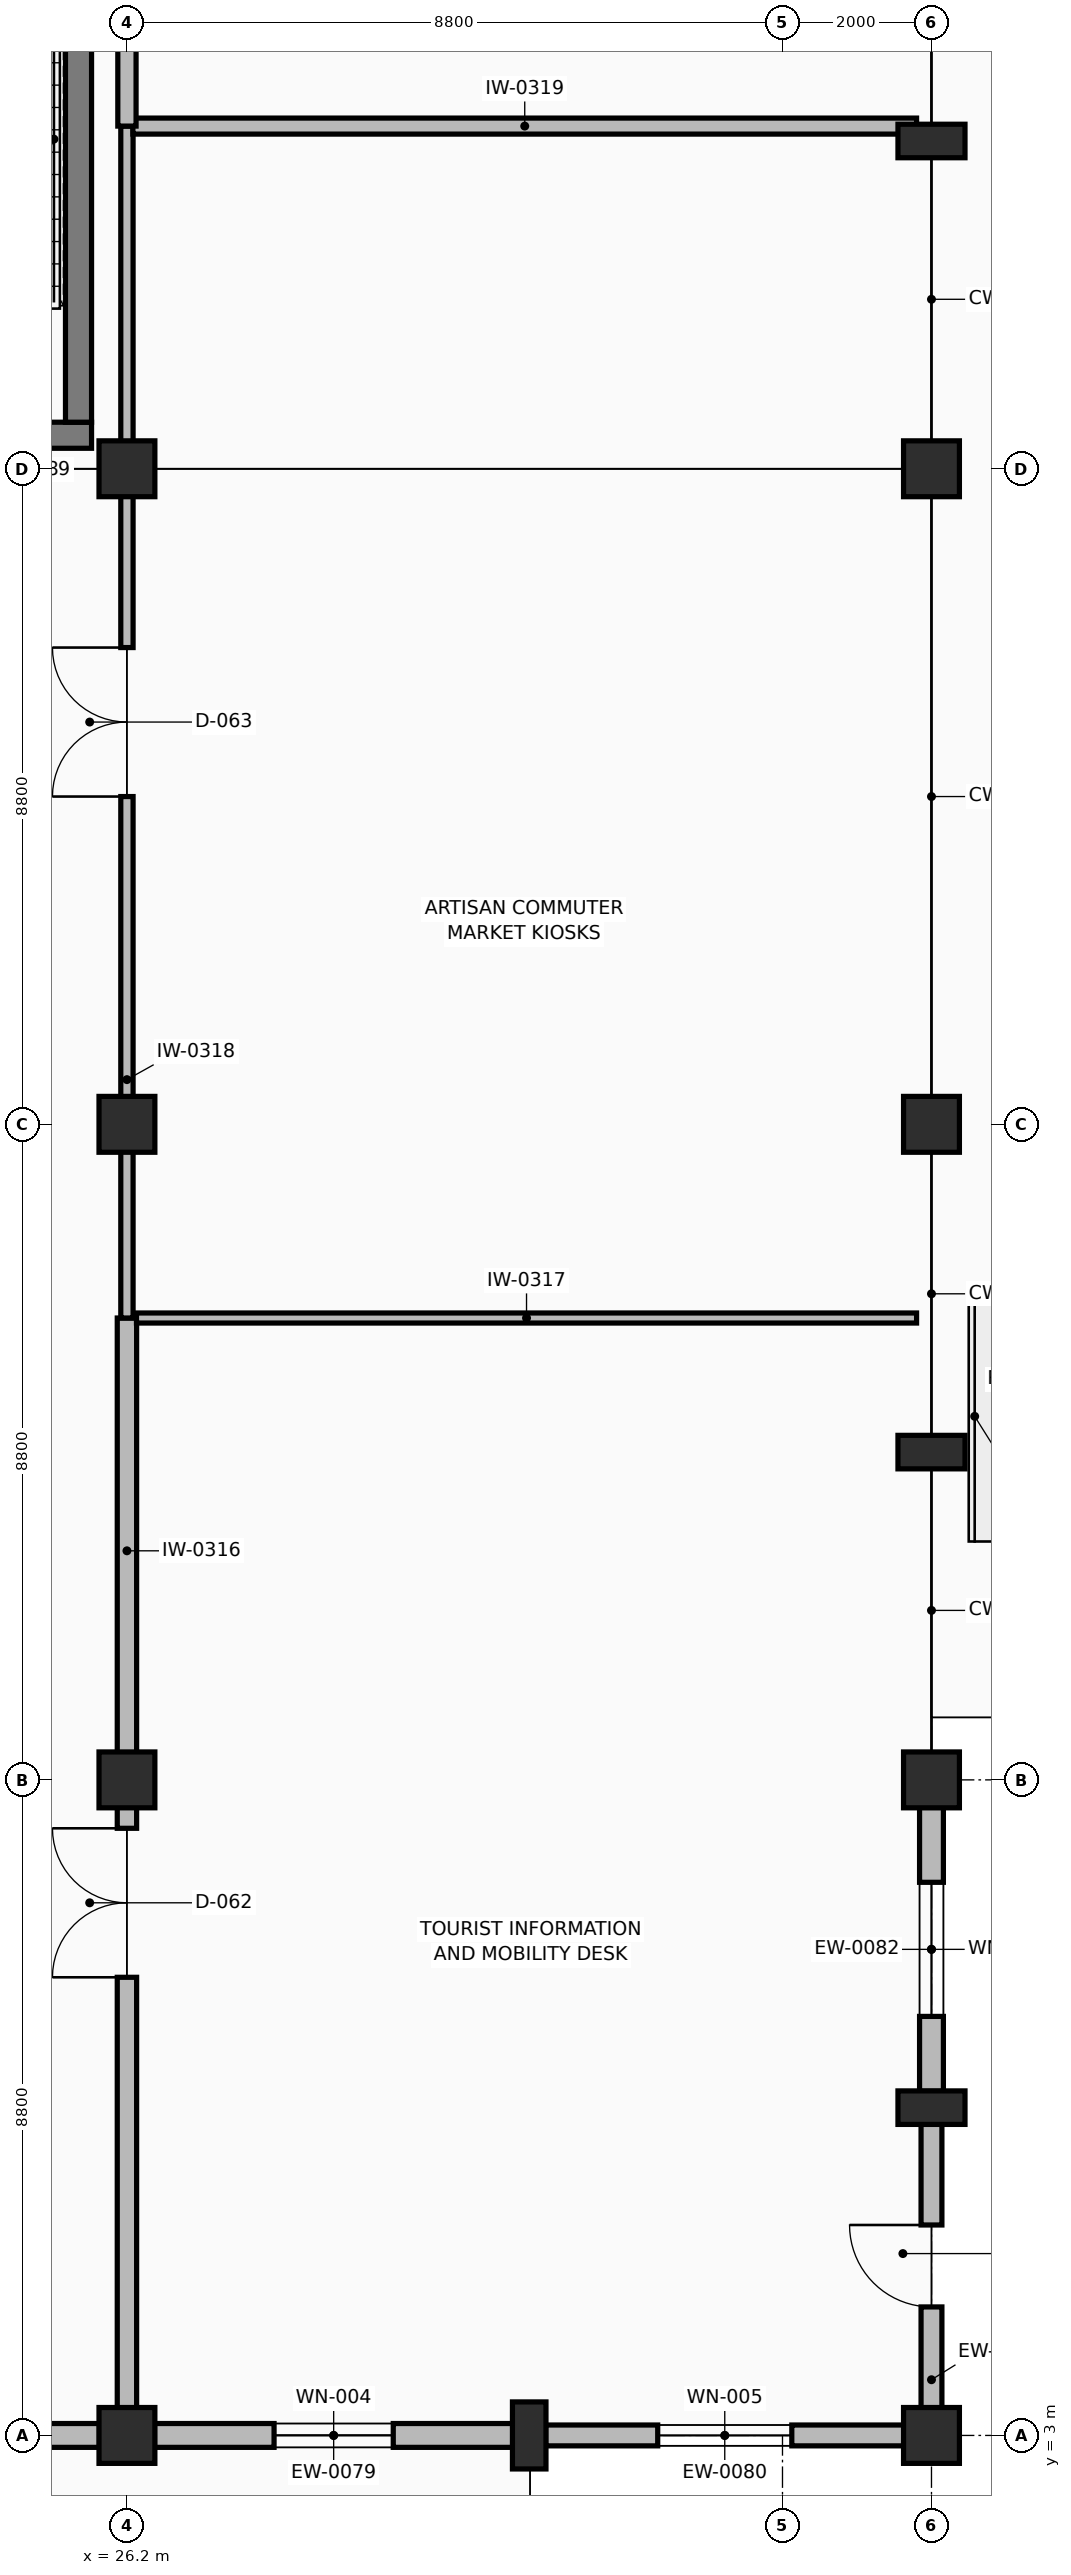
"""IFC4 building model, lengths in metres.
Left out: names, types, materials, properties, quantities, classifications, styles, units other than length and angle.
Written with IfcOpenShell. Run it as: python <this file> out.ifc"""

import sys

from ifc_helpers import new_model, si_unit, direction, frame, frame_2d, origin, origin_2d, place, context, subcontext, project, spatial, rectangle, extrude, element, fill, save


model = new_model("IFC4")
c1 = context("Model", 3, precision=1e-05, world=origin(), true_north=direction((0.0, 1.0)))
c2 = subcontext(c1, "Body", "Model", "MODEL_VIEW")
j1 = project(units=[si_unit("LENGTHUNIT", "METRE"), si_unit("PLANEANGLEUNIT", "RADIAN")], contexts=[c1])
p1 = place(None, origin())
s1 = spatial("IfcSite", under=j1, at=p1, CompositionType="ELEMENT")
p2 = place(p1, origin())
s2 = spatial("IfcBuilding", under=s1, at=p2, CompositionType="ELEMENT")
p3 = place(p2, origin())
s3 = spatial("IfcBuildingStorey", under=s2, at=p3, CompositionType="ELEMENT", Elevation=0.0)
for number, where, z_axis, x_axis in (
    (1, (26.2, 3.0, 0.0), (0.0, 0.0, 1.0), (1.0, 0.0, 0.0)),
    (2, (26.2, 11.8, 0.0), (0.0, 0.0, 1.0), (1.0, 0.0, 0.0)),
    (3, (26.2, 20.6, 0.0), (0.0, 0.0, 1.0), (1.0, 0.0, 0.0)),
    (4, (26.2, 29.4, 0.0), (0.0, 0.0, 1.0), (1.0, 0.0, 0.0)),
    (5, (37.0, 3.0, 0.0), (0.0, 0.0, 1.0), (1.0, 0.0, 0.0)),
    (6, (37.0, 11.8, 0.0), (0.0, 0.0, 1.0), (1.0, 0.0, 0.0)),
    (7, (37.0, 20.6, 0.0), (0.0, 0.0, 1.0), (1.0, 0.0, 0.0)),
    (8, (37.0, 29.4, 0.0), (0.0, 0.0, 1.0), (1.0, 0.0, 0.0)),
):
    element("IfcColumn", number, at=place(p3, frame(where, z_axis=z_axis, x_axis=x_axis)), inside=s3, PredefinedType="COLUMN", context=c2, shape_type="SweptSolid", body=[
        extrude(rectangle(XDim=0.75, YDim=0.75, at=origin_2d()), origin(), (0.0, 0.0, 1.0), 4.8),
    ])
for number, where, z_axis, x_axis in (
    (9, (31.6, 3.0, 0.0), (0.0, 0.0, 1.0), (1.0, 0.0, 0.0)),
    (10, (37.0, 7.4, 0.0), (0.0, 0.0, 1.0), (0.0, 1.0, 0.0)),
    (11, (37.0, 16.2, 0.0), (0.0, 0.0, 1.0), (0.0, 1.0, 0.0)),
    (12, (37.0, 33.8, 0.0), (0.0, 0.0, 1.0), (0.0, 1.0, 0.0)),
):
    element("IfcColumn", number, at=place(p3, frame(where, z_axis=z_axis, x_axis=x_axis)), inside=s3, PredefinedType="PILASTER", context=c2, shape_type="SweptSolid", body=[
        extrude(rectangle(XDim=0.45, YDim=0.9, at=origin_2d()), origin(), (0.0, 0.0, 1.0), 4.8),
    ])
p4 = place(p3, frame((21.92, 3.0, 0.0), z_axis=(0.0, 0.0, 1.0), x_axis=(1.0, 0.0, 0.0)))
e13 = element("IfcWall", 13, at=p4, inside=s3, PredefinedType="SOLIDWALL", context=c2, shape_type="SweptSolid", body=[
    extrude(rectangle(XDim=3.91, YDim=0.32, at=frame_2d((1.955, 0.0))), origin(), (0.0, 0.0, 1.0), 3.625),
])
p5 = place(p4, frame((1.205, 0.0, 0.9)))
e14 = element("IfcOpeningElement", 14, at=p5, cuts=e13, PredefinedType="OPENING", context=c2, shape_type="SweptSolid", body=[
    extrude(rectangle(XDim=1.5, YDim=1.5, at=frame_2d((0.75, 0.75))), frame((0.0, 0.17, 0.0), z_axis=(0.0, -1.0, 0.0), x_axis=(1.0, 0.0, 0.0)), (0.0, 0.0, 1.0), 0.34),
])
p6 = place(p3, frame((26.57, 3.0, 0.0), z_axis=(0.0, 0.0, 1.0), x_axis=(1.0, 0.0, 0.0)))
e15 = element("IfcWall", 15, at=p6, inside=s3, PredefinedType="SOLIDWALL", context=c2, shape_type="SweptSolid", body=[
    extrude(rectangle(XDim=4.81, YDim=0.32, at=frame_2d((2.405, 0.0))), origin(), (0.0, 0.0, 1.0), 3.625),
])
p7 = place(p6, frame((1.605, 0.0, 0.9)))
e16 = element("IfcOpeningElement", 16, at=p7, cuts=e15, PredefinedType="OPENING", context=c2, shape_type="SweptSolid", body=[
    extrude(rectangle(XDim=1.6, YDim=1.55, at=frame_2d((0.8, 0.775))), frame((0.0, 0.17, 0.0), z_axis=(0.0, -1.0, 0.0), x_axis=(1.0, 0.0, 0.0)), (0.0, 0.0, 1.0), 0.34),
])
p8 = place(p3, frame((31.82, 3.0, 0.0), z_axis=(0.0, 0.0, 1.0), x_axis=(1.0, 0.0, 0.0)))
e17 = element("IfcWall", 17, at=p8, inside=s3, PredefinedType="SOLIDWALL", context=c2, shape_type="SweptSolid", body=[
    extrude(rectangle(XDim=4.81, YDim=0.28, at=frame_2d((2.405, 0.0))), origin(), (0.0, 0.0, 1.0), 3.625),
])
p9 = place(p8, frame((1.505, 0.0, 0.9)))
e18 = element("IfcOpeningElement", 18, at=p9, cuts=e17, PredefinedType="OPENING", context=c2, shape_type="SweptSolid", body=[
    extrude(rectangle(XDim=1.8, YDim=1.5, at=frame_2d((0.9, 0.75))), frame((0.0, 0.15, 0.0), z_axis=(0.0, -1.0, 0.0), x_axis=(1.0, 0.0, 0.0)), (0.0, 0.0, 1.0), 0.3),
])
p10 = place(p3, frame((37.0, 3.37, 0.0), z_axis=(0.0, 0.0, 1.0), x_axis=(0.0, 1.0, 0.0)))
e19 = element("IfcWall", 19, at=p10, inside=s3, PredefinedType="SOLIDWALL", context=c2, shape_type="SweptSolid", body=[
    extrude(rectangle(XDim=3.81, YDim=0.28, at=frame_2d((1.905, 0.0))), origin(), (0.0, 0.0, 1.0), 3.625),
])
p11 = place(p10, frame((1.355, 0.0, 0.0)))
e20 = element("IfcOpeningElement", 20, at=p11, cuts=e19, PredefinedType="OPENING", context=c2, shape_type="SweptSolid", body=[
    extrude(rectangle(XDim=1.1, YDim=2.2, at=frame_2d((0.55, 1.1))), frame((0.0, 0.15, 0.0), z_axis=(0.0, -1.0, 0.0), x_axis=(1.0, 0.0, 0.0)), (0.0, 0.0, 1.0), 0.3),
])
p12 = place(p3, frame((37.0, 7.62, 0.0), z_axis=(0.0, 0.0, 1.0), x_axis=(0.0, 1.0, 0.0)))
e21 = element("IfcWall", 21, at=p12, inside=s3, PredefinedType="SOLIDWALL", context=c2, shape_type="SweptSolid", body=[
    extrude(rectangle(XDim=3.81, YDim=0.32, at=frame_2d((1.905, 0.0))), origin(), (0.0, 0.0, 1.0), 3.625),
])
p13 = place(p12, frame((1.005, 0.0, 0.9)))
e22 = element("IfcOpeningElement", 22, at=p13, cuts=e21, PredefinedType="OPENING", context=c2, shape_type="SweptSolid", body=[
    extrude(rectangle(XDim=1.8, YDim=1.6, at=frame_2d((0.9, 0.8))), frame((0.0, 0.17, 0.0), z_axis=(0.0, -1.0, 0.0), x_axis=(1.0, 0.0, 0.0)), (0.0, 0.0, 1.0), 0.34),
])
p14 = place(p3, frame((21.475, 29.85, 0.0), z_axis=(0.0, 0.0, 1.0), x_axis=(1.0, 0.0, 0.0)))
e23 = element("IfcWall", 23, at=p14, inside=s3, PredefinedType="SHEAR", context=c2, shape_type="SweptSolid", body=[
    extrude(rectangle(XDim=4.25, YDim=0.35, at=frame_2d((2.125, 0.0))), origin(), (0.0, 0.0, 1.0), 4.49),
])
p15 = place(p14, frame((1.3, 0.0, 0.0)))
e24 = element("IfcOpeningElement", 24, at=p15, cuts=e23, PredefinedType="OPENING", context=c2, shape_type="SweptSolid", body=[
    extrude(rectangle(XDim=1.1, YDim=2.2, at=frame_2d((0.55, 1.1))), frame((0.0, 0.185, 0.0), z_axis=(0.0, -1.0, 0.0), x_axis=(1.0, 0.0, 0.0)), (0.0, 0.0, 1.0), 0.37),
])
p16 = place(p3, frame((25.55, 30.025, 0.0), z_axis=(0.0, 0.0, 1.0), x_axis=(0.0, 1.0, 0.0)))
e25 = element("IfcWall", 25, at=p16, inside=s3, PredefinedType="SHEAR", context=c2, shape_type="SweptSolid", body=[
    extrude(rectangle(XDim=7.45, YDim=0.35, at=frame_2d((3.725, 0.0))), origin(), (0.0, 0.0, 1.0), 4.49),
])
p17 = place(p3, frame((26.2, 3.2, 0.0), z_axis=(0.0, 0.0, 1.0), x_axis=(0.0, 1.0, 0.0)))
e26 = element("IfcWall", 26, at=p17, inside=s3, PredefinedType="PARTITIONING", context=c2, shape_type="SweptSolid", body=[
    extrude(rectangle(XDim=14.8, YDim=0.26, at=frame_2d((7.4, 0.0))), origin(), (0.0, 0.0, 1.0), 3.515),
])
p18 = place(p17, frame((5.95, 0.0, 0.0)))
e27 = element("IfcOpeningElement", 27, at=p18, cuts=e26, PredefinedType="OPENING", context=c2, shape_type="SweptSolid", body=[
    extrude(rectangle(XDim=2.0, YDim=2.4, at=frame_2d((1.0, 1.2))), frame((0.0, 0.14, 0.0), z_axis=(0.0, -1.0, 0.0), x_axis=(1.0, 0.0, 0.0)), (0.0, 0.0, 1.0), 0.28),
])
p19 = place(p3, frame((26.328, 18.0, 0.0), z_axis=(0.0, 0.0, 1.0), x_axis=(1.0, 0.0, 0.0)))
e28 = element("IfcWall", 28, at=p19, inside=s3, PredefinedType="PARTITIONING", context=c2, shape_type="SweptSolid", body=[
    extrude(rectangle(XDim=10.472, YDim=0.135, at=frame_2d((5.236, 0.0))), origin(), (0.0, 0.0, 1.0), 3.515),
])
p20 = place(p3, frame((26.2, 18.0, 0.0), z_axis=(0.0, 0.0, 1.0), x_axis=(0.0, 1.0, 0.0)))
e29 = element("IfcWall", 29, at=p20, inside=s3, PredefinedType="PARTITIONING", context=c2, shape_type="SweptSolid", body=[
    extrude(rectangle(XDim=16.0, YDim=0.165, at=frame_2d((8.0, 0.0))), origin(), (0.0, 0.0, 1.0), 3.515),
])
p21 = place(p20, frame((7.0, 0.0, 0.0)))
e30 = element("IfcOpeningElement", 30, at=p21, cuts=e29, PredefinedType="OPENING", context=c2, shape_type="SweptSolid", body=[
    extrude(rectangle(XDim=2.0, YDim=2.4, at=frame_2d((1.0, 1.2))), frame((0.0, 0.093, 0.0), z_axis=(0.0, -1.0, 0.0), x_axis=(1.0, 0.0, 0.0)), (0.0, 0.0, 1.0), 0.185),
])
p22 = place(p3, frame((26.28, 34.0, 0.0), z_axis=(0.0, 0.0, 1.0), x_axis=(1.0, 0.0, 0.0)))
e31 = element("IfcWall", 31, at=p22, inside=s3, PredefinedType="PARTITIONING", context=c2, shape_type="SweptSolid", body=[
    extrude(rectangle(XDim=10.52, YDim=0.215, at=frame_2d((5.26, 0.0))), origin(), (0.0, 0.0, 1.0), 3.515),
])
p23 = place(p3, frame((26.2, 34.0, 0.0), z_axis=(0.0, 0.0, 1.0), x_axis=(0.0, 1.0, 0.0)))
e32 = element("IfcWall", 32, at=p23, inside=s3, PredefinedType="PARTITIONING", context=c2, shape_type="SweptSolid", body=[
    extrude(rectangle(XDim=12.8, YDim=0.245, at=frame_2d((6.4, 0.0))), origin(), (0.0, 0.0, 1.0), 3.225),
])
p24 = place(p23, frame((5.9, 0.0, 0.0)))
e33 = element("IfcOpeningElement", 33, at=p24, cuts=e32, PredefinedType="OPENING", context=c2, shape_type="SweptSolid", body=[
    extrude(rectangle(XDim=1.0, YDim=2.15, at=frame_2d((0.5, 1.075))), frame((0.0, 0.133, 0.0), z_axis=(0.0, -1.0, 0.0), x_axis=(1.0, 0.0, 0.0)), (0.0, 0.0, 1.0), 0.265),
])
p25 = place(p7, origin())
e34 = element("IfcWindow", 34, at=p25, inside=s3, PartitioningType="SINGLE_PANEL", PredefinedType="WINDOW", context=c2, shape_type="SweptSolid", body=[
    extrude(rectangle(XDim=1.6, YDim=1.55, at=frame_2d((0.8, 0.775))), frame((0.0, 0.03, 0.0), z_axis=(0.0, -1.0, 0.0), x_axis=(1.0, 0.0, 0.0)), (0.0, 0.0, 1.0), 0.06),
])
fill(e16, e34)
p26 = place(p9, origin())
e35 = element("IfcWindow", 35, at=p26, inside=s3, PartitioningType="SINGLE_PANEL", PredefinedType="WINDOW", context=c2, shape_type="SweptSolid", body=[
    extrude(rectangle(XDim=1.8, YDim=1.5, at=frame_2d((0.9, 0.75))), frame((0.0, 0.03, 0.0), z_axis=(0.0, -1.0, 0.0), x_axis=(1.0, 0.0, 0.0)), (0.0, 0.0, 1.0), 0.06),
])
fill(e18, e35)
p27 = place(p11, origin())
e36 = element("IfcDoor", 36, at=p27, inside=s3, OperationType="SINGLE_SWING_RIGHT", PredefinedType="DOOR", context=c2, shape_type="SweptSolid", body=[
    extrude(rectangle(XDim=1.1, YDim=2.2, at=frame_2d((0.55, 1.1))), frame((0.0, 0.025, 0.0), z_axis=(0.0, -1.0, 0.0), x_axis=(1.0, 0.0, 0.0)), (0.0, 0.0, 1.0), 0.05),
])
fill(e20, e36)
p28 = place(p13, origin())
e37 = element("IfcWindow", 37, at=p28, inside=s3, PartitioningType="SINGLE_PANEL", PredefinedType="WINDOW", context=c2, shape_type="SweptSolid", body=[
    extrude(rectangle(XDim=1.8, YDim=1.6, at=frame_2d((0.9, 0.8))), frame((0.0, 0.03, 0.0), z_axis=(0.0, -1.0, 0.0), x_axis=(1.0, 0.0, 0.0)), (0.0, 0.0, 1.0), 0.06),
])
fill(e22, e37)
p29 = place(p18, origin())
e38 = element("IfcDoor", 38, at=p29, inside=s3, OperationType="DOUBLE_DOOR_SINGLE_SWING", PredefinedType="DOOR", context=c2, shape_type="SweptSolid", body=[
    extrude(rectangle(XDim=2.0, YDim=2.4, at=frame_2d((1.0, 1.2))), frame((0.0, 0.025, 0.0), z_axis=(0.0, -1.0, 0.0), x_axis=(1.0, 0.0, 0.0)), (0.0, 0.0, 1.0), 0.05),
])
fill(e27, e38)
p30 = place(p21, origin())
e39 = element("IfcDoor", 39, at=p30, inside=s3, OperationType="DOUBLE_DOOR_SINGLE_SWING", PredefinedType="DOOR", context=c2, shape_type="SweptSolid", body=[
    extrude(rectangle(XDim=2.0, YDim=2.4, at=frame_2d((1.0, 1.2))), frame((0.0, 0.025, 0.0), z_axis=(0.0, -1.0, 0.0), x_axis=(1.0, 0.0, 0.0)), (0.0, 0.0, 1.0), 0.05),
])
fill(e30, e39)
save(model, sys.argv[1])
